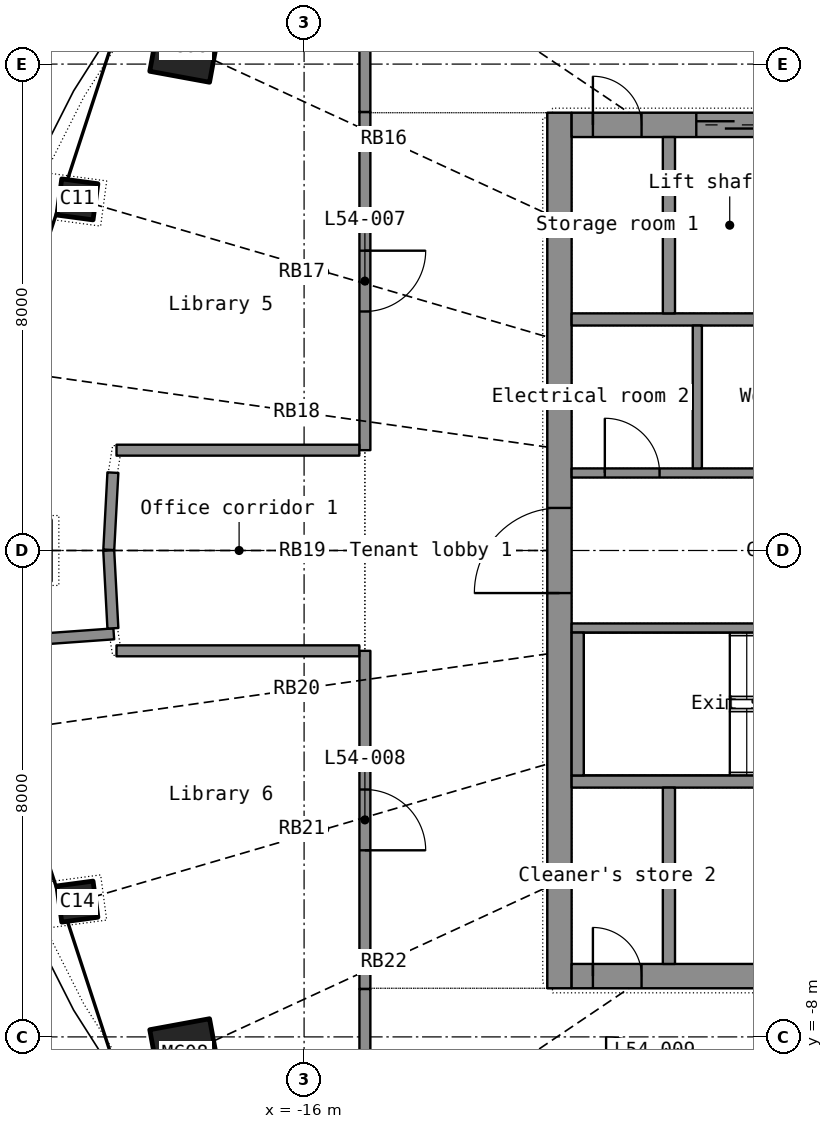
"""IFC4 building model, lengths in metres.
Left out: names, types, materials, properties, quantities, classifications, styles, units other than length and angle.
Written with IfcOpenShell. Run it as: python <this file> out.ifc"""

import sys

from ifc_helpers import new_model, si_unit, direction, frame, frame_2d, origin, origin_2d, place, context, subcontext, project, spatial, rectangle, hollow_rectangle, extrude, element, fill, save


model = new_model("IFC4")
c1 = context("Model", 3, precision=1e-05, world=origin(), true_north=direction((0.0, 1.0)))
c2 = subcontext(c1, "Body", "Model", "MODEL_VIEW")
j1 = project(units=[si_unit("LENGTHUNIT", "METRE"), si_unit("PLANEANGLEUNIT", "RADIAN")], contexts=[c1])
p1 = place(None, origin())
s1 = spatial("IfcSite", under=j1, at=p1, CompositionType="ELEMENT")
p2 = place(p1, origin())
s2 = spatial("IfcBuilding", under=s1, at=p2, CompositionType="ELEMENT")
p3 = place(p2, frame((0.0, 0.0, 224.5)))
s3 = spatial("IfcBuildingStorey", under=s2, at=p3, CompositionType="ELEMENT", Elevation=224.5)
p4 = place(p3, frame((-17.956, 8.283, 0.0), z_axis=(0.029940667, -0.01417895, 0.999451106), x_axis=(0.584227285, 0.811568001, -0.005988259)))
e1 = element("IfcColumn", 1, at=p4, inside=s3, PredefinedType="COLUMN", context=c2, shape_type="SweptSolid", body=[
    extrude(hollow_rectangle(XDim=1.0, YDim=1.0, WallThickness=0.032, at=origin_2d()), origin(), (0.0, 0.0, 1.0), 3.702),
])
p5 = place(p3, frame((-19.728, 5.775, 0.0), z_axis=(0.032511791, -0.009694185, 0.999424337), x_axis=(0.410569675, 0.911818067, -0.00451162)))
e2 = element("IfcColumn", 2, at=p5, inside=s3, PredefinedType="COLUMN", context=c2, shape_type="SweptSolid", body=[
    extrude(hollow_rectangle(XDim=0.6, YDim=0.6, WallThickness=0.025, at=origin_2d()), origin(), (0.0, 0.0, 1.0), 3.702),
])
p6 = place(p3, frame((-20.672, 0.0, 0.0), z_axis=(0.034555398, 0.0, 0.999402784), x_axis=(0.0, 1.0, 0.0)))
e3 = element("IfcColumn", 3, at=p6, inside=s3, PredefinedType="COLUMN", context=c2, shape_type="SweptSolid", body=[
    extrude(hollow_rectangle(XDim=1.0, YDim=1.0, WallThickness=0.032, at=origin_2d()), origin(), (0.0, 0.0, 1.0), 3.702),
])
p7 = place(p3, frame((-19.728, -5.775, 0.0), z_axis=(0.032511791, 0.009694185, 0.999424337), x_axis=(-0.410569675, 0.911818067, 0.00451162)))
e4 = element("IfcColumn", 4, at=p7, inside=s3, PredefinedType="COLUMN", context=c2, shape_type="SweptSolid", body=[
    extrude(hollow_rectangle(XDim=0.6, YDim=0.6, WallThickness=0.025, at=origin_2d()), origin(), (0.0, 0.0, 1.0), 3.702),
])
p8 = place(p3, frame((-17.956, -8.283, 0.0), z_axis=(0.029940667, 0.01417895, 0.999451106), x_axis=(-0.584227285, 0.811568001, 0.005988259)))
e5 = element("IfcColumn", 5, at=p8, inside=s3, PredefinedType="COLUMN", context=c2, shape_type="SweptSolid", body=[
    extrude(hollow_rectangle(XDim=1.0, YDim=1.0, WallThickness=0.032, at=origin_2d()), origin(), (0.0, 0.0, 1.0), 3.702),
])
p9 = place(p3, frame((-11.8, -7.2, 0.0), z_axis=(0.0, 0.0, 1.0), x_axis=(0.0, 1.0, 0.0)))
e6 = element("IfcWall", 6, at=p9, inside=s3, PredefinedType="SHEAR", context=c2, shape_type="SweptSolid", body=[
    extrude(rectangle(XDim=14.4, YDim=0.4, at=frame_2d((7.2, 0.0))), origin(), (0.0, 0.0, 1.0), 3.3),
])
p10 = place(p9, frame((6.5, 0.0, 0.0)))
e7 = element("IfcOpeningElement", 7, at=p10, cuts=e6, PredefinedType="OPENING", context=c2, shape_type="SweptSolid", body=[
    extrude(rectangle(XDim=1.4, YDim=2.2, at=frame_2d((0.7, 1.1))), frame((0.0, 0.21, 0.0), z_axis=(0.0, -1.0, 0.0), x_axis=(1.0, 0.0, 0.0)), (0.0, 0.0, 1.0), 0.42),
])
p11 = place(p3, frame((-11.6, -7.0, 0.0), z_axis=(0.0, 0.0, 1.0), x_axis=(1.0, 0.0, 0.0)))
e8 = element("IfcWall", 8, at=p11, inside=s3, PredefinedType="SHEAR", context=c2, shape_type="SweptSolid", body=[
    extrude(rectangle(XDim=23.2, YDim=0.4, at=frame_2d((11.6, 0.0))), origin(), (0.0, 0.0, 1.0), 3.3),
])
p12 = place(p11, frame((20.05, 0.0, 0.0)))
e9 = element("IfcOpeningElement", 9, at=p12, cuts=e8, PredefinedType="OPENING", context=c2, shape_type="SweptSolid", body=[
    extrude(rectangle(XDim=1.1, YDim=2.2, at=frame_2d((0.55, 1.1))), frame((0.0, 0.21, 0.0), z_axis=(0.0, -1.0, 0.0), x_axis=(1.0, 0.0, 0.0)), (0.0, 0.0, 1.0), 0.42),
])
p13 = place(p11, frame((5.15, 0.0, 0.0)))
e10 = element("IfcOpeningElement", 10, at=p13, cuts=e8, PredefinedType="OPENING", context=c2, shape_type="SweptSolid", body=[
    extrude(rectangle(XDim=0.9, YDim=2.1, at=frame_2d((0.45, 1.05))), frame((0.0, 0.21, 0.0), z_axis=(0.0, -1.0, 0.0), x_axis=(1.0, 0.0, 0.0)), (0.0, 0.0, 1.0), 0.42),
])
p14 = place(p11, frame((12.15, 0.0, 0.0)))
e11 = element("IfcOpeningElement", 11, at=p14, cuts=e8, PredefinedType="OPENING", context=c2, shape_type="SweptSolid", body=[
    extrude(rectangle(XDim=0.9, YDim=2.1, at=frame_2d((0.45, 1.05))), frame((0.0, 0.21, 0.0), z_axis=(0.0, -1.0, 0.0), x_axis=(1.0, 0.0, 0.0)), (0.0, 0.0, 1.0), 0.42),
])
p15 = place(p11, frame((17.15, 0.0, 0.0)))
e12 = element("IfcOpeningElement", 12, at=p15, cuts=e8, PredefinedType="OPENING", context=c2, shape_type="SweptSolid", body=[
    extrude(rectangle(XDim=0.9, YDim=2.1, at=frame_2d((0.45, 1.05))), frame((0.0, 0.21, 0.0), z_axis=(0.0, -1.0, 0.0), x_axis=(1.0, 0.0, 0.0)), (0.0, 0.0, 1.0), 0.42),
])
p16 = place(p11, frame((0.35, 0.0, 0.0)))
e13 = element("IfcOpeningElement", 13, at=p16, cuts=e8, PredefinedType="OPENING", context=c2, shape_type="SweptSolid", body=[
    extrude(rectangle(XDim=0.8, YDim=2.05, at=frame_2d((0.4, 1.025))), frame((0.0, 0.21, 0.0), z_axis=(0.0, -1.0, 0.0), x_axis=(1.0, 0.0, 0.0)), (0.0, 0.0, 1.0), 0.42),
])
p17 = place(p11, frame((22.05, 0.0, 0.0)))
e14 = element("IfcOpeningElement", 14, at=p17, cuts=e8, PredefinedType="OPENING", context=c2, shape_type="SweptSolid", body=[
    extrude(rectangle(XDim=0.8, YDim=2.05, at=frame_2d((0.4, 1.025))), frame((0.0, 0.21, 0.0), z_axis=(0.0, -1.0, 0.0), x_axis=(1.0, 0.0, 0.0)), (0.0, 0.0, 1.0), 0.42),
])
p18 = place(p3, frame((-11.6, 7.0, 0.0), z_axis=(0.0, 0.0, 1.0), x_axis=(1.0, 0.0, 0.0)))
e15 = element("IfcWall", 15, at=p18, inside=s3, PredefinedType="SHEAR", context=c2, shape_type="SweptSolid", body=[
    extrude(rectangle(XDim=23.2, YDim=0.4, at=frame_2d((11.6, 0.0))), origin(), (0.0, 0.0, 1.0), 3.3),
])
p19 = place(p18, frame((2.05, 0.0, 0.0)))
e16 = element("IfcOpeningElement", 16, at=p19, cuts=e15, PredefinedType="OPENING", context=c2, shape_type="SweptSolid", body=[
    extrude(rectangle(XDim=1.1, YDim=2.2, at=frame_2d((0.55, 1.1))), frame((0.0, 0.21, 0.0), z_axis=(0.0, -1.0, 0.0), x_axis=(1.0, 0.0, 0.0)), (0.0, 0.0, 1.0), 0.42),
])
p20 = place(p18, frame((6.05, 0.0, 0.0)))
e17 = element("IfcOpeningElement", 17, at=p20, cuts=e15, PredefinedType="OPENING", context=c2, shape_type="SweptSolid", body=[
    extrude(rectangle(XDim=1.1, YDim=2.2, at=frame_2d((0.55, 1.1))), frame((0.0, 0.21, 0.0), z_axis=(0.0, -1.0, 0.0), x_axis=(1.0, 0.0, 0.0)), (0.0, 0.0, 1.0), 0.42),
])
p21 = place(p18, frame((8.05, 0.0, 0.0)))
e18 = element("IfcOpeningElement", 18, at=p21, cuts=e15, PredefinedType="OPENING", context=c2, shape_type="SweptSolid", body=[
    extrude(rectangle(XDim=1.1, YDim=2.2, at=frame_2d((0.55, 1.1))), frame((0.0, 0.21, 0.0), z_axis=(0.0, -1.0, 0.0), x_axis=(1.0, 0.0, 0.0)), (0.0, 0.0, 1.0), 0.42),
])
p22 = place(p18, frame((10.05, 0.0, 0.0)))
e19 = element("IfcOpeningElement", 19, at=p22, cuts=e15, PredefinedType="OPENING", context=c2, shape_type="SweptSolid", body=[
    extrude(rectangle(XDim=1.1, YDim=2.2, at=frame_2d((0.55, 1.1))), frame((0.0, 0.21, 0.0), z_axis=(0.0, -1.0, 0.0), x_axis=(1.0, 0.0, 0.0)), (0.0, 0.0, 1.0), 0.42),
])
p23 = place(p18, frame((12.05, 0.0, 0.0)))
e20 = element("IfcOpeningElement", 20, at=p23, cuts=e15, PredefinedType="OPENING", context=c2, shape_type="SweptSolid", body=[
    extrude(rectangle(XDim=1.1, YDim=2.2, at=frame_2d((0.55, 1.1))), frame((0.0, 0.21, 0.0), z_axis=(0.0, -1.0, 0.0), x_axis=(1.0, 0.0, 0.0)), (0.0, 0.0, 1.0), 0.42),
])
p24 = place(p18, frame((14.05, 0.0, 0.0)))
e21 = element("IfcOpeningElement", 21, at=p24, cuts=e15, PredefinedType="OPENING", context=c2, shape_type="SweptSolid", body=[
    extrude(rectangle(XDim=1.1, YDim=2.2, at=frame_2d((0.55, 1.1))), frame((0.0, 0.21, 0.0), z_axis=(0.0, -1.0, 0.0), x_axis=(1.0, 0.0, 0.0)), (0.0, 0.0, 1.0), 0.42),
])
p25 = place(p18, frame((16.05, 0.0, 0.0)))
e22 = element("IfcOpeningElement", 22, at=p25, cuts=e15, PredefinedType="OPENING", context=c2, shape_type="SweptSolid", body=[
    extrude(rectangle(XDim=1.1, YDim=2.2, at=frame_2d((0.55, 1.1))), frame((0.0, 0.21, 0.0), z_axis=(0.0, -1.0, 0.0), x_axis=(1.0, 0.0, 0.0)), (0.0, 0.0, 1.0), 0.42),
])
p26 = place(p18, frame((18.05, 0.0, 0.0)))
e23 = element("IfcOpeningElement", 23, at=p26, cuts=e15, PredefinedType="OPENING", context=c2, shape_type="SweptSolid", body=[
    extrude(rectangle(XDim=1.1, YDim=2.2, at=frame_2d((0.55, 1.1))), frame((0.0, 0.21, 0.0), z_axis=(0.0, -1.0, 0.0), x_axis=(1.0, 0.0, 0.0)), (0.0, 0.0, 1.0), 0.42),
])
p27 = place(p18, frame((20.05, 0.0, 0.0)))
e24 = element("IfcOpeningElement", 24, at=p27, cuts=e15, PredefinedType="OPENING", context=c2, shape_type="SweptSolid", body=[
    extrude(rectangle(XDim=1.1, YDim=2.2, at=frame_2d((0.55, 1.1))), frame((0.0, 0.21, 0.0), z_axis=(0.0, -1.0, 0.0), x_axis=(1.0, 0.0, 0.0)), (0.0, 0.0, 1.0), 0.42),
])
p28 = place(p18, frame((4.15, 0.0, 0.0)))
e25 = element("IfcOpeningElement", 25, at=p28, cuts=e15, PredefinedType="OPENING", context=c2, shape_type="SweptSolid", body=[
    extrude(rectangle(XDim=0.9, YDim=2.1, at=frame_2d((0.45, 1.05))), frame((0.0, 0.21, 0.0), z_axis=(0.0, -1.0, 0.0), x_axis=(1.0, 0.0, 0.0)), (0.0, 0.0, 1.0), 0.42),
])
p29 = place(p18, frame((0.35, 0.0, 0.0)))
e26 = element("IfcOpeningElement", 26, at=p29, cuts=e15, PredefinedType="OPENING", context=c2, shape_type="SweptSolid", body=[
    extrude(rectangle(XDim=0.8, YDim=2.05, at=frame_2d((0.4, 1.025))), frame((0.0, 0.21, 0.0), z_axis=(0.0, -1.0, 0.0), x_axis=(1.0, 0.0, 0.0)), (0.0, 0.0, 1.0), 0.42),
])
p30 = place(p18, frame((22.05, 0.0, 0.0)))
e27 = element("IfcOpeningElement", 27, at=p30, cuts=e15, PredefinedType="OPENING", context=c2, shape_type="SweptSolid", body=[
    extrude(rectangle(XDim=0.8, YDim=2.05, at=frame_2d((0.4, 1.025))), frame((0.0, 0.21, 0.0), z_axis=(0.0, -1.0, 0.0), x_axis=(1.0, 0.0, 0.0)), (0.0, 0.0, 1.0), 0.42),
])
for number, where, z_axis, x_axis in (
    (28, (-11.6, -3.8, 0.0), (0.0, 0.0, 1.0), (1.0, 0.0, 0.0)),
    (29, (-11.6, 3.8, 0.0), (0.0, 0.0, 1.0), (1.0, 0.0, 0.0)),
):
    element("IfcWall", number, at=place(p3, frame(where, z_axis=z_axis, x_axis=x_axis)), inside=s3, PredefinedType="SHEAR", context=c2, shape_type="SweptSolid", body=[
        extrude(rectangle(XDim=23.2, YDim=0.2, at=frame_2d((11.6, 0.0))), origin(), (0.0, 0.0, 1.0), 3.3),
    ])
for number, where, z_axis, x_axis in (
    (30, (-10.0, -6.8, 0.0), (0.0, 0.0, 1.0), (0.0, 1.0, 0.0)),
    (31, (-10.0, 3.9, 0.0), (0.0, 0.0, 1.0), (0.0, 1.0, 0.0)),
):
    element("IfcWall", number, at=place(p3, frame(where, z_axis=z_axis, x_axis=x_axis)), inside=s3, PredefinedType="SHEAR", context=c2, shape_type="SweptSolid", body=[
        extrude(rectangle(XDim=2.9, YDim=0.2, at=frame_2d((1.45, 0.0))), origin(), (0.0, 0.0, 1.0), 3.3),
    ])
p31 = place(p3, frame((-11.6, -1.275, 0.0), z_axis=(0.0, 0.0, 1.0), x_axis=(1.0, 0.0, 0.0)))
e32 = element("IfcWall", 32, at=p31, inside=s3, PredefinedType="SHEAR", context=c2, shape_type="SweptSolid", body=[
    extrude(rectangle(XDim=8.6, YDim=0.15, at=frame_2d((4.3, 0.0))), origin(), (0.0, 0.0, 1.0), 3.3),
])
p32 = place(p31, frame((5.45, 0.0, 0.0)))
e33 = element("IfcOpeningElement", 33, at=p32, cuts=e32, PredefinedType="OPENING", context=c2, shape_type="SweptSolid", body=[
    extrude(rectangle(XDim=1.1, YDim=2.15, at=frame_2d((0.55, 1.075))), frame((0.0, 0.085, 0.0), z_axis=(0.0, -1.0, 0.0), x_axis=(1.0, 0.0, 0.0)), (0.0, 0.0, 1.0), 0.17),
])
p33 = place(p31, frame((7.25, 0.0, 0.0)))
e34 = element("IfcOpeningElement", 34, at=p33, cuts=e32, PredefinedType="OPENING", context=c2, shape_type="SweptSolid", body=[
    extrude(rectangle(XDim=0.9, YDim=2.1, at=frame_2d((0.45, 1.05))), frame((0.0, 0.085, 0.0), z_axis=(0.0, -1.0, 0.0), x_axis=(1.0, 0.0, 0.0)), (0.0, 0.0, 1.0), 0.17),
])
p34 = place(p3, frame((-11.6, 1.275, 0.0), z_axis=(0.0, 0.0, 1.0), x_axis=(1.0, 0.0, 0.0)))
e35 = element("IfcWall", 35, at=p34, inside=s3, PredefinedType="PARTITIONING", context=c2, shape_type="SweptSolid", body=[
    extrude(rectangle(XDim=8.6, YDim=0.15, at=frame_2d((4.3, 0.0))), origin(), (0.0, 0.0, 1.0), 3.3),
])
p35 = place(p34, frame((0.546, 0.0, 0.0)))
e36 = element("IfcOpeningElement", 36, at=p35, cuts=e35, PredefinedType="OPENING", context=c2, shape_type="SweptSolid", body=[
    extrude(rectangle(XDim=0.9, YDim=2.1, at=frame_2d((0.45, 1.05))), frame((0.0, 0.085, 0.0), z_axis=(0.0, -1.0, 0.0), x_axis=(1.0, 0.0, 0.0)), (0.0, 0.0, 1.0), 0.17),
])
p36 = place(p34, frame((3.294, 0.0, 0.0)))
e37 = element("IfcOpeningElement", 37, at=p36, cuts=e35, PredefinedType="OPENING", context=c2, shape_type="SweptSolid", body=[
    extrude(rectangle(XDim=0.85, YDim=2.1, at=frame_2d((0.425, 1.05))), frame((0.0, 0.085, 0.0), z_axis=(0.0, -1.0, 0.0), x_axis=(1.0, 0.0, 0.0)), (0.0, 0.0, 1.0), 0.17),
])
p37 = place(p34, frame((6.598, 0.0, 0.0)))
e38 = element("IfcOpeningElement", 38, at=p37, cuts=e35, PredefinedType="OPENING", context=c2, shape_type="SweptSolid", body=[
    extrude(rectangle(XDim=0.85, YDim=2.1, at=frame_2d((0.425, 1.05))), frame((0.0, 0.085, 0.0), z_axis=(0.0, -1.0, 0.0), x_axis=(1.0, 0.0, 0.0)), (0.0, 0.0, 1.0), 0.17),
])
p38 = place(p3, frame((-11.5, -3.7, 0.0), z_axis=(0.0, 0.0, 1.0), x_axis=(0.0, 1.0, 0.0)))
e39 = element("IfcWall", 39, at=p38, inside=s3, PredefinedType="SHEAR", context=c2, shape_type="SweptSolid", body=[
    extrude(rectangle(XDim=2.35, YDim=0.2, at=frame_2d((1.175, 0.0))), origin(), (0.0, 0.0, 1.0), 3.3),
])
p39 = place(p3, frame((-9.533, 1.35, 0.0), z_axis=(0.0, 0.0, 1.0), x_axis=(0.0, 1.0, 0.0)))
e40 = element("IfcWall", 40, at=p39, inside=s3, PredefinedType="PARTITIONING", context=c2, shape_type="SweptSolid", body=[
    extrude(rectangle(XDim=2.35, YDim=0.15, at=frame_2d((1.175, 0.0))), origin(), (0.0, 0.0, 1.0), 3.3),
])
p40 = place(p3, frame((-15.0, -1.65, 0.0), z_axis=(0.0, 0.0, 1.0), x_axis=(0.0, -1.0, 0.0)))
e41 = element("IfcWall", 41, at=p40, inside=s3, PredefinedType="PARTITIONING", context=c2, shape_type="SweptSolid", body=[
    extrude(rectangle(XDim=5.562, YDim=0.18, at=frame_2d((2.781, 0.0))), origin(), (0.0, 0.0, 1.0), 2.4),
])
p41 = place(p40, frame((2.281, 0.0, 0.0)))
e42 = element("IfcOpeningElement", 42, at=p41, cuts=e41, PredefinedType="OPENING", context=c2, shape_type="SweptSolid", body=[
    extrude(rectangle(XDim=1.0, YDim=2.1, at=frame_2d((0.5, 1.05))), frame((0.0, 0.1, 0.0), z_axis=(0.0, -1.0, 0.0), x_axis=(1.0, 0.0, 0.0)), (0.0, 0.0, 1.0), 0.2),
])
p42 = place(p3, frame((-15.0, 7.212, 0.0), z_axis=(0.0, 0.0, 1.0), x_axis=(0.0, -1.0, 0.0)))
e43 = element("IfcWall", 43, at=p42, inside=s3, PredefinedType="PARTITIONING", context=c2, shape_type="SweptSolid", body=[
    extrude(rectangle(XDim=5.562, YDim=0.18, at=frame_2d((2.781, 0.0))), origin(), (0.0, 0.0, 1.0), 2.4),
])
p43 = place(p42, frame((2.281, 0.0, 0.0)))
e44 = element("IfcOpeningElement", 44, at=p43, cuts=e43, PredefinedType="OPENING", context=c2, shape_type="SweptSolid", body=[
    extrude(rectangle(XDim=1.0, YDim=2.1, at=frame_2d((0.5, 1.05))), frame((0.0, 0.1, 0.0), z_axis=(0.0, -1.0, 0.0), x_axis=(1.0, 0.0, 0.0)), (0.0, 0.0, 1.0), 0.2),
])
for number, where, z_axis, x_axis in (
    (45, (-15.092, 1.65, 0.0), (0.0, 0.0, 1.0), (-1.0, 0.0, 0.0)),
    (46, (-19.085, -1.65, 0.0), (0.0, 0.0, 1.0), (1.0, 0.0, 0.0)),
):
    element("IfcWall", number, at=place(p3, frame(where, z_axis=z_axis, x_axis=x_axis)), inside=s3, PredefinedType="PARTITIONING", context=c2, shape_type="SweptSolid", body=[
        extrude(rectangle(XDim=3.993, YDim=0.18, at=frame_2d((1.997, 0.0))), origin(), (0.0, 0.0, 1.0), 2.4),
    ])
p44 = place(p3, frame((-21.633, -1.55, 0.0), z_axis=(0.0, 0.0, 1.0), x_axis=(0.997440396, 0.071502847, 0.0)))
e47 = element("IfcWall", 47, at=p44, inside=s3, PredefinedType="PARTITIONING", context=c2, shape_type="SweptSolid", body=[
    extrude(rectangle(XDim=2.51, YDim=0.18, at=frame_2d((1.255, 0.0))), origin(), (0.0, 0.0, 1.0), 2.4),
])
p45 = place(p3, frame((-15.0, 9.508, 0.0), z_axis=(0.0, 0.0, 1.0), x_axis=(0.0, -1.0, 0.0)))
e48 = element("IfcWall", 48, at=p45, inside=s3, PredefinedType="PARTITIONING", context=c2, shape_type="SweptSolid", body=[
    extrude(rectangle(XDim=2.295, YDim=0.18, at=frame_2d((1.147, 0.0))), origin(), (0.0, 0.0, 1.0), 2.4),
])
p46 = place(p3, frame((-15.0, -7.213, 0.0), z_axis=(0.0, 0.0, 1.0), x_axis=(0.0, -1.0, 0.0)))
e49 = element("IfcWall", 49, at=p46, inside=s3, PredefinedType="PARTITIONING", context=c2, shape_type="SweptSolid", body=[
    extrude(rectangle(XDim=1.31, YDim=0.18, at=frame_2d((0.655, 0.0))), origin(), (0.0, 0.0, 1.0), 2.4),
])
p47 = place(p3, frame((-19.213, 0.0, 0.0), z_axis=(0.0, 0.0, 1.0), x_axis=(0.053158846, -0.998586069, 0.0)))
e50 = element("IfcWall", 50, at=p47, inside=s3, PredefinedType="PARTITIONING", context=c2, shape_type="SweptSolid", body=[
    extrude(rectangle(XDim=1.281, YDim=0.18, at=frame_2d((0.641, 0.0))), origin(), (0.0, 0.0, 1.0), 2.4),
])
p48 = place(p3, frame((-19.144, 1.281, 0.0), z_axis=(0.0, 0.0, 1.0), x_axis=(-0.053214222, -0.99858312, 0.0)))
e51 = element("IfcWall", 51, at=p48, inside=s3, PredefinedType="PARTITIONING", context=c2, shape_type="SweptSolid", body=[
    extrude(rectangle(XDim=1.271, YDim=0.18, at=frame_2d((0.635, 0.0))), origin(), (0.0, 0.0, 1.0), 2.4),
])
p49 = place(p16, origin())
e52 = element("IfcDoor", 52, at=p49, inside=s3, OperationType="SINGLE_SWING_LEFT", PredefinedType="DOOR", context=c2, shape_type="SweptSolid", body=[
    extrude(rectangle(XDim=0.8, YDim=2.05, at=frame_2d((0.4, 1.025))), frame((0.0, 0.025, 0.0), z_axis=(0.0, -1.0, 0.0), x_axis=(1.0, 0.0, 0.0)), (0.0, 0.0, 1.0), 0.05),
])
fill(e13, e52)
p50 = place(p19, origin())
e53 = element("IfcDoor", 53, at=p50, inside=s3, OperationType="DOUBLE_DOOR_SLIDING", PredefinedType="DOOR", context=c2, shape_type="SweptSolid", body=[
    extrude(rectangle(XDim=1.1, YDim=2.2, at=frame_2d((0.55, 1.1))), frame((0.0, 0.025, 0.0), z_axis=(0.0, -1.0, 0.0), x_axis=(1.0, 0.0, 0.0)), (0.0, 0.0, 1.0), 0.05),
])
fill(e16, e53)
p51 = place(p29, origin())
e54 = element("IfcDoor", 54, at=p51, inside=s3, OperationType="SINGLE_SWING_LEFT", PredefinedType="DOOR", context=c2, shape_type="SweptSolid", body=[
    extrude(rectangle(XDim=0.8, YDim=2.05, at=frame_2d((0.4, 1.025))), frame((0.0, 0.025, 0.0), z_axis=(0.0, -1.0, 0.0), x_axis=(1.0, 0.0, 0.0)), (0.0, 0.0, 1.0), 0.05),
])
fill(e26, e54)
p52 = place(p10, origin())
e55 = element("IfcDoor", 55, at=p52, inside=s3, OperationType="DOUBLE_DOOR_SINGLE_SWING", PredefinedType="DOOR", context=c2, shape_type="SweptSolid", body=[
    extrude(rectangle(XDim=1.4, YDim=2.2, at=frame_2d((0.7, 1.1))), frame((0.0, 0.025, 0.0), z_axis=(0.0, -1.0, 0.0), x_axis=(1.0, 0.0, 0.0)), (0.0, 0.0, 1.0), 0.05),
])
fill(e7, e55)
p53 = place(p35, origin())
e56 = element("IfcDoor", 56, at=p53, inside=s3, OperationType="SINGLE_SWING_LEFT", PredefinedType="DOOR", context=c2, shape_type="SweptSolid", body=[
    extrude(rectangle(XDim=0.9, YDim=2.1, at=frame_2d((0.45, 1.05))), frame((0.0, 0.025, 0.0), z_axis=(0.0, -1.0, 0.0), x_axis=(1.0, 0.0, 0.0)), (0.0, 0.0, 1.0), 0.05),
])
fill(e36, e56)
p54 = place(p43, origin())
e57 = element("IfcDoor", 57, at=p54, inside=s3, OperationType="SINGLE_SWING_LEFT", PredefinedType="DOOR", context=c2, shape_type="SweptSolid", body=[
    extrude(rectangle(XDim=1.0, YDim=2.1, at=frame_2d((0.5, 1.05))), frame((0.0, 0.025, 0.0), z_axis=(0.0, -1.0, 0.0), x_axis=(1.0, 0.0, 0.0)), (0.0, 0.0, 1.0), 0.05),
])
fill(e44, e57)
p55 = place(p41, origin())
e58 = element("IfcDoor", 58, at=p55, inside=s3, OperationType="SINGLE_SWING_RIGHT", PredefinedType="DOOR", context=c2, shape_type="SweptSolid", body=[
    extrude(rectangle(XDim=1.0, YDim=2.1, at=frame_2d((0.5, 1.05))), frame((0.0, 0.025, 0.0), z_axis=(0.0, -1.0, 0.0), x_axis=(1.0, 0.0, 0.0)), (0.0, 0.0, 1.0), 0.05),
])
fill(e42, e58)
save(model, sys.argv[1])
